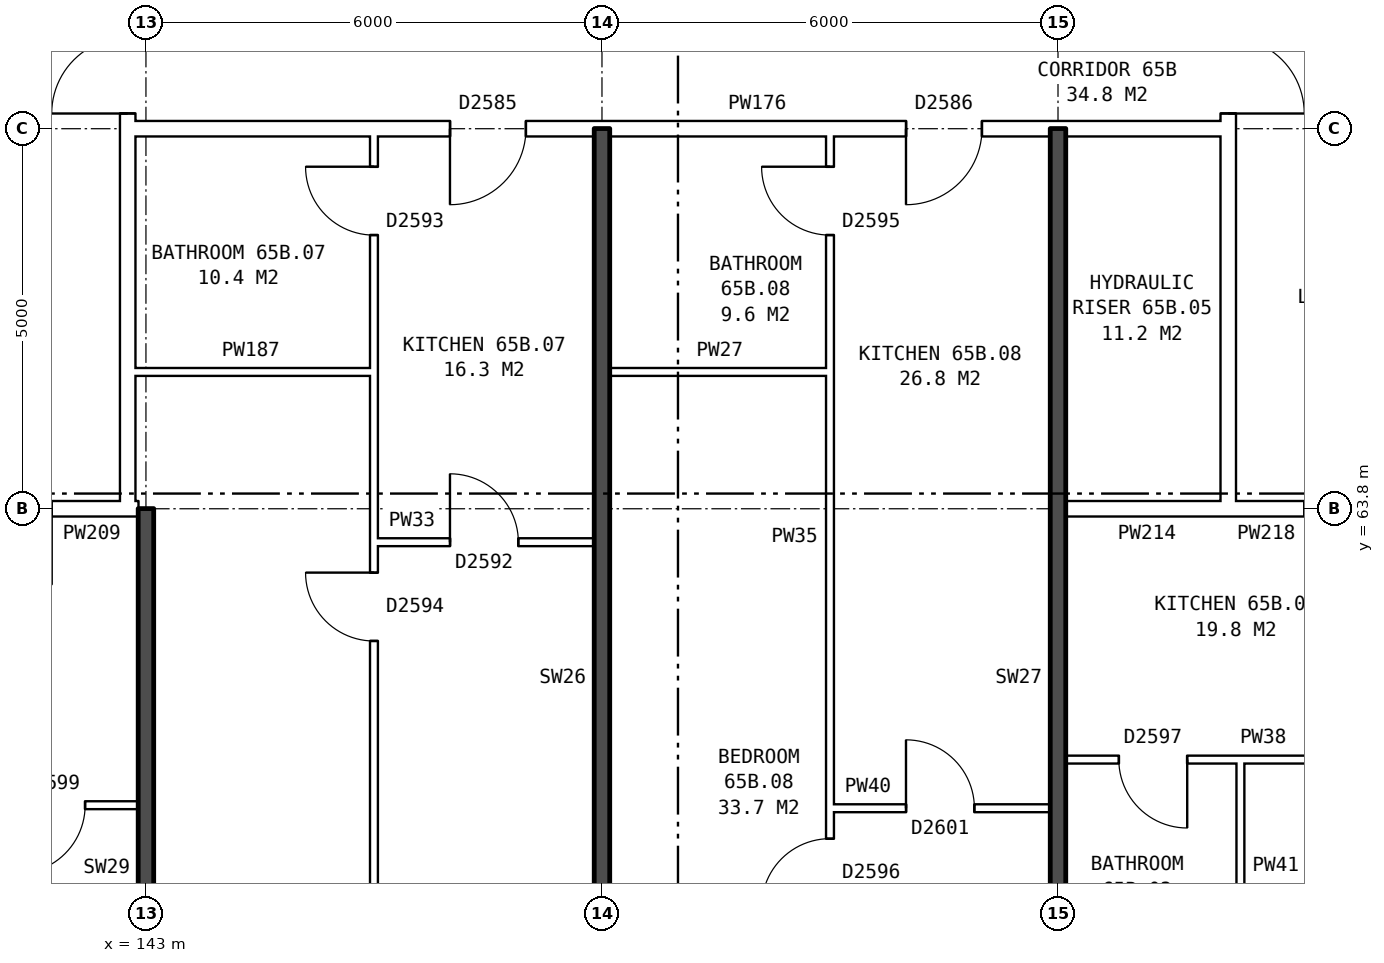
"""IFC4 building model, lengths in metres.
Left out: names, types, materials, properties, quantities, classifications, styles, units other than length and angle.
Written with IfcOpenShell. Run it as: python <this file> out.ifc"""

import sys

from ifc_helpers import new_model, si_unit, direction, frame, frame_2d, origin, place, context, subcontext, project, spatial, rectangle, extrude, element, fill, save


model = new_model("IFC4")
c1 = context("Model", 3, precision=1e-05, world=origin(), true_north=direction((0.0, 1.0)))
c2 = subcontext(c1, "Body", "Model", "MODEL_VIEW")
j1 = project(units=[si_unit("LENGTHUNIT", "METRE"), si_unit("PLANEANGLEUNIT", "RADIAN")], contexts=[c1])
p1 = place(None, origin())
s1 = spatial("IfcSite", under=j1, at=p1, CompositionType="ELEMENT")
p2 = place(p1, origin())
s2 = spatial("IfcBuilding", under=s1, at=p2, CompositionType="ELEMENT")
p3 = place(p2, frame((0.0, 0.0, 230.7)))
s3 = spatial("IfcBuildingStorey", under=s2, at=p3, CompositionType="ELEMENT", Elevation=230.7)
p4 = place(p3, frame((142.76, 63.9, 0.0), z_axis=(0.0, 0.0, 1.0), x_axis=(0.0, 1.0, 0.0)))
e1 = element("IfcWall", 1, at=p4, inside=s3, PredefinedType="PARTITIONING", context=c2, shape_type="SweptSolid", body=[
    extrude(rectangle(XDim=12.2, YDim=0.2, at=frame_2d((6.1, 0.0))), origin(), (0.0, 0.0, 1.0), 2.85),
])
p5 = place(p4, frame((5.1, 0.0, 0.0)))
e2 = element("IfcOpeningElement", 2, at=p5, cuts=e1, PredefinedType="OPENING", context=c2, shape_type="SweptSolid", body=[
    extrude(rectangle(XDim=2.0, YDim=2.1, at=frame_2d((1.0, 1.05))), frame((0.0, 0.11, 0.0), z_axis=(0.0, -1.0, 0.0), x_axis=(1.0, 0.0, 0.0)), (0.0, 0.0, 1.0), 0.22),
])
p6 = place(p3, frame((157.24, 63.9, 0.0), z_axis=(0.0, 0.0, 1.0), x_axis=(0.0, 1.0, 0.0)))
e3 = element("IfcWall", 3, at=p6, inside=s3, PredefinedType="PARTITIONING", context=c2, shape_type="SweptSolid", body=[
    extrude(rectangle(XDim=12.2, YDim=0.2, at=frame_2d((6.1, 0.0))), origin(), (0.0, 0.0, 1.0), 2.85),
])
p7 = place(p6, frame((5.1, 0.0, 0.0)))
e4 = element("IfcOpeningElement", 4, at=p7, cuts=e3, PredefinedType="OPENING", context=c2, shape_type="SweptSolid", body=[
    extrude(rectangle(XDim=2.0, YDim=2.1, at=frame_2d((1.0, 1.05))), frame((0.0, 0.11, 0.0), z_axis=(0.0, -1.0, 0.0), x_axis=(1.0, 0.0, 0.0)), (0.0, 0.0, 1.0), 0.22),
])
p8 = place(p3, frame((152.0, 59.86, 0.0), z_axis=(0.0, 0.0, 1.0), x_axis=(1.0, 0.0, 0.0)))
e5 = element("IfcWall", 5, at=p8, inside=s3, PredefinedType="PARTITIONING", context=c2, shape_type="SweptSolid", body=[
    extrude(rectangle(XDim=2.9, YDim=0.1, at=frame_2d((1.45, 0.0))), origin(), (0.0, 0.0, 1.0), 2.85),
])
p9 = place(p8, frame((1.0, 0.0, 0.0)))
e6 = element("IfcOpeningElement", 6, at=p9, cuts=e5, PredefinedType="OPENING", context=c2, shape_type="SweptSolid", body=[
    extrude(rectangle(XDim=0.9, YDim=2.1, at=frame_2d((0.45, 1.05))), frame((0.0, 0.06, 0.0), z_axis=(0.0, -1.0, 0.0), x_axis=(1.0, 0.0, 0.0)), (0.0, 0.0, 1.0), 0.12),
])
p10 = place(p3, frame((137.1, 59.9, 0.0), z_axis=(0.0, 0.0, 1.0), x_axis=(1.0, 0.0, 0.0)))
e7 = element("IfcWall", 7, at=p10, inside=s3, PredefinedType="PARTITIONING", context=c2, shape_type="SweptSolid", body=[
    extrude(rectangle(XDim=5.8, YDim=0.1, at=frame_2d((2.9, 0.0))), origin(), (0.0, 0.0, 1.0), 2.85),
])
p11 = place(p10, frame((1.3, 0.0, 0.0)))
e8 = element("IfcOpeningElement", 8, at=p11, cuts=e7, PredefinedType="OPENING", context=c2, shape_type="SweptSolid", body=[
    extrude(rectangle(XDim=0.9, YDim=2.1, at=frame_2d((0.45, 1.05))), frame((0.0, 0.06, 0.0), z_axis=(0.0, -1.0, 0.0), x_axis=(1.0, 0.0, 0.0)), (0.0, 0.0, 1.0), 0.12),
])
p12 = place(p10, frame((4.2, 0.0, 0.0)))
e9 = element("IfcOpeningElement", 9, at=p12, cuts=e7, PredefinedType="OPENING", context=c2, shape_type="SweptSolid", body=[
    extrude(rectangle(XDim=0.9, YDim=2.1, at=frame_2d((0.45, 1.05))), frame((0.0, 0.06, 0.0), z_axis=(0.0, -1.0, 0.0), x_axis=(1.0, 0.0, 0.0)), (0.0, 0.0, 1.0), 0.12),
])
p13 = place(p3, frame((155.1, 60.5, 0.0), z_axis=(0.0, 0.0, 1.0), x_axis=(1.0, 0.0, 0.0)))
e10 = element("IfcWall", 10, at=p13, inside=s3, PredefinedType="PARTITIONING", context=c2, shape_type="SweptSolid", body=[
    extrude(rectangle(XDim=5.8, YDim=0.1, at=frame_2d((2.9, 0.0))), origin(), (0.0, 0.0, 1.0), 2.85),
])
p14 = place(p13, frame((3.6, 0.0, 0.0)))
e11 = element("IfcOpeningElement", 11, at=p14, cuts=e10, PredefinedType="OPENING", context=c2, shape_type="SweptSolid", body=[
    extrude(rectangle(XDim=0.9, YDim=2.1, at=frame_2d((0.45, 1.05))), frame((0.0, 0.06, 0.0), z_axis=(0.0, -1.0, 0.0), x_axis=(1.0, 0.0, 0.0)), (0.0, 0.0, 1.0), 0.12),
])
p15 = place(p13, frame((0.7, 0.0, 0.0)))
e12 = element("IfcOpeningElement", 12, at=p15, cuts=e10, PredefinedType="OPENING", context=c2, shape_type="SweptSolid", body=[
    extrude(rectangle(XDim=0.9, YDim=2.1, at=frame_2d((0.45, 1.05))), frame((0.0, 0.06, 0.0), z_axis=(0.0, -1.0, 0.0), x_axis=(1.0, 0.0, 0.0)), (0.0, 0.0, 1.0), 0.12),
])
p16 = place(p3, frame((146.0, 63.36, 0.0), z_axis=(0.0, 0.0, 1.0), x_axis=(1.0, 0.0, 0.0)))
e13 = element("IfcWall", 13, at=p16, inside=s3, PredefinedType="PARTITIONING", context=c2, shape_type="SweptSolid", body=[
    extrude(rectangle(XDim=2.9, YDim=0.1, at=frame_2d((1.45, 0.0))), origin(), (0.0, 0.0, 1.0), 2.85),
])
p17 = place(p16, frame((1.0, 0.0, 0.0)))
e14 = element("IfcOpeningElement", 14, at=p17, cuts=e13, PredefinedType="OPENING", context=c2, shape_type="SweptSolid", body=[
    extrude(rectangle(XDim=0.9, YDim=2.1, at=frame_2d((0.45, 1.05))), frame((0.0, 0.06, 0.0), z_axis=(0.0, -1.0, 0.0), x_axis=(1.0, 0.0, 0.0)), (0.0, 0.0, 1.0), 0.12),
])
p18 = place(p3, frame((139.76, 63.8, 0.0), z_axis=(0.0, 0.0, 1.0), x_axis=(1.0, 0.0, 0.0)))
e15 = element("IfcWall", 15, at=p18, inside=s3, PredefinedType="PARTITIONING", context=c2, shape_type="SweptSolid", body=[
    extrude(rectangle(XDim=3.0, YDim=0.2, at=frame_2d((1.5, 0.0))), origin(), (0.0, 0.0, 1.0), 2.85),
])
p19 = place(p18, frame((1.0, 0.0, 0.0)))
e16 = element("IfcOpeningElement", 16, at=p19, cuts=e15, PredefinedType="OPENING", context=c2, shape_type="SweptSolid", body=[
    extrude(rectangle(XDim=1.0, YDim=2.1, at=frame_2d((0.5, 1.05))), frame((0.0, 0.11, 0.0), z_axis=(0.0, -1.0, 0.0), x_axis=(1.0, 0.0, 0.0)), (0.0, 0.0, 1.0), 0.22),
])
p20 = place(p3, frame((142.76, 63.8, 0.0), z_axis=(0.0, 0.0, 1.0), x_axis=(1.0, 0.0, 0.0)))
e17 = element("IfcWall", 17, at=p20, inside=s3, PredefinedType="PARTITIONING", context=c2, shape_type="SweptSolid", body=[
    extrude(rectangle(XDim=0.14, YDim=0.2, at=frame_2d((0.07, 0.0))), origin(), (0.0, 0.0, 1.0), 2.85),
])
p21 = place(p3, frame((155.1, 63.8, 0.0), z_axis=(0.0, 0.0, 1.0), x_axis=(1.0, 0.0, 0.0)))
e18 = element("IfcWall", 18, at=p21, inside=s3, PredefinedType="PARTITIONING", context=c2, shape_type="SweptSolid", body=[
    extrude(rectangle(XDim=2.14, YDim=0.2, at=frame_2d((1.07, 0.0))), origin(), (0.0, 0.0, 1.0), 2.85),
])
p22 = place(p3, frame((157.24, 63.8, 0.0), z_axis=(0.0, 0.0, 1.0), x_axis=(1.0, 0.0, 0.0)))
e19 = element("IfcWall", 19, at=p22, inside=s3, PredefinedType="PARTITIONING", context=c2, shape_type="SweptSolid", body=[
    extrude(rectangle(XDim=3.0, YDim=0.2, at=frame_2d((1.5, 0.0))), origin(), (0.0, 0.0, 1.0), 2.85),
])
p23 = place(p22, frame((1.0, 0.0, 0.0)))
e20 = element("IfcOpeningElement", 20, at=p23, cuts=e19, PredefinedType="OPENING", context=c2, shape_type="SweptSolid", body=[
    extrude(rectangle(XDim=1.0, YDim=2.1, at=frame_2d((0.5, 1.05))), frame((0.0, 0.11, 0.0), z_axis=(0.0, -1.0, 0.0), x_axis=(1.0, 0.0, 0.0)), (0.0, 0.0, 1.0), 0.22),
])
p24 = place(p3, frame((142.76, 65.6, 0.0), z_axis=(0.0, 0.0, 1.0), x_axis=(1.0, 0.0, 0.0)))
e21 = element("IfcWall", 21, at=p24, inside=s3, PredefinedType="PARTITIONING", context=c2, shape_type="SweptSolid", body=[
    extrude(rectangle(XDim=3.24, YDim=0.1, at=frame_2d((1.62, 0.0))), origin(), (0.0, 0.0, 1.0), 2.85),
])
p25 = place(p3, frame((149.1, 65.6, 0.0), z_axis=(0.0, 0.0, 1.0), x_axis=(1.0, 0.0, 0.0)))
e22 = element("IfcWall", 22, at=p25, inside=s3, PredefinedType="PARTITIONING", context=c2, shape_type="SweptSolid", body=[
    extrude(rectangle(XDim=2.9, YDim=0.1, at=frame_2d((1.45, 0.0))), origin(), (0.0, 0.0, 1.0), 2.85),
])
p26 = place(p3, frame((142.76, 68.8, 0.0), z_axis=(0.0, 0.0, 1.0), x_axis=(1.0, 0.0, 0.0)))
e23 = element("IfcWall", 23, at=p26, inside=s3, PredefinedType="PARTITIONING", context=c2, shape_type="SweptSolid", body=[
    extrude(rectangle(XDim=14.48, YDim=0.2, at=frame_2d((7.24, 0.0))), origin(), (0.0, 0.0, 1.0), 2.85),
])
p27 = place(p26, frame((4.24, 0.0, 0.0)))
e24 = element("IfcOpeningElement", 24, at=p27, cuts=e23, PredefinedType="OPENING", context=c2, shape_type="SweptSolid", body=[
    extrude(rectangle(XDim=1.0, YDim=2.1, at=frame_2d((0.5, 1.05))), frame((0.0, 0.11, 0.0), z_axis=(0.0, -1.0, 0.0), x_axis=(1.0, 0.0, 0.0)), (0.0, 0.0, 1.0), 0.22),
])
p28 = place(p26, frame((10.24, 0.0, 0.0)))
e25 = element("IfcOpeningElement", 25, at=p28, cuts=e23, PredefinedType="OPENING", context=c2, shape_type="SweptSolid", body=[
    extrude(rectangle(XDim=1.0, YDim=2.1, at=frame_2d((0.5, 1.05))), frame((0.0, 0.11, 0.0), z_axis=(0.0, -1.0, 0.0), x_axis=(1.0, 0.0, 0.0)), (0.0, 0.0, 1.0), 0.22),
])
p29 = place(p3, frame((143.0, 54.36, 0.0), z_axis=(0.0, 0.0, 1.0), x_axis=(0.0, 1.0, 0.0)))
e26 = element("IfcWall", 26, at=p29, inside=s3, PredefinedType="SOLIDWALL", context=c2, shape_type="SweptSolid", body=[
    extrude(rectangle(XDim=9.44, YDim=0.2, at=frame_2d((4.72, 0.0))), origin(), (0.0, 0.0, 1.0), 2.85),
])
p30 = place(p3, frame((146.0, 54.36, 0.0), z_axis=(0.0, 0.0, 1.0), x_axis=(0.0, 1.0, 0.0)))
e27 = element("IfcWall", 27, at=p30, inside=s3, PredefinedType="PARTITIONING", context=c2, shape_type="SweptSolid", body=[
    extrude(rectangle(XDim=14.34, YDim=0.1, at=frame_2d((7.17, 0.0))), origin(), (0.0, 0.0, 1.0), 2.85),
])
p31 = place(p30, frame((7.7, 0.0, 0.0)))
e28 = element("IfcOpeningElement", 28, at=p31, cuts=e27, PredefinedType="OPENING", context=c2, shape_type="SweptSolid", body=[
    extrude(rectangle(XDim=0.9, YDim=2.1, at=frame_2d((0.45, 1.05))), frame((0.0, 0.06, 0.0), z_axis=(0.0, -1.0, 0.0), x_axis=(1.0, 0.0, 0.0)), (0.0, 0.0, 1.0), 0.12),
])
p32 = place(p30, frame((13.04, 0.0, 0.0)))
e29 = element("IfcOpeningElement", 29, at=p32, cuts=e27, PredefinedType="OPENING", context=c2, shape_type="SweptSolid", body=[
    extrude(rectangle(XDim=0.9, YDim=2.1, at=frame_2d((0.45, 1.05))), frame((0.0, 0.06, 0.0), z_axis=(0.0, -1.0, 0.0), x_axis=(1.0, 0.0, 0.0)), (0.0, 0.0, 1.0), 0.12),
])
p33 = place(p3, frame((149.0, 54.36, 0.0), z_axis=(0.0, 0.0, 1.0), x_axis=(0.0, 1.0, 0.0)))
e30 = element("IfcWall", 30, at=p33, inside=s3, PredefinedType="SOLIDWALL", context=c2, shape_type="SweptSolid", body=[
    extrude(rectangle(XDim=14.44, YDim=0.2, at=frame_2d((7.22, 0.0))), origin(), (0.0, 0.0, 1.0), 2.85),
])
p34 = place(p3, frame((152.0, 54.36, 0.0), z_axis=(0.0, 0.0, 1.0), x_axis=(0.0, 1.0, 0.0)))
e31 = element("IfcWall", 31, at=p34, inside=s3, PredefinedType="PARTITIONING", context=c2, shape_type="SweptSolid", body=[
    extrude(rectangle(XDim=14.34, YDim=0.1, at=frame_2d((7.17, 0.0))), origin(), (0.0, 0.0, 1.0), 2.85),
])
p35 = place(p34, frame((4.2, 0.0, 0.0)))
e32 = element("IfcOpeningElement", 32, at=p35, cuts=e31, PredefinedType="OPENING", context=c2, shape_type="SweptSolid", body=[
    extrude(rectangle(XDim=0.9, YDim=2.1, at=frame_2d((0.45, 1.05))), frame((0.0, 0.06, 0.0), z_axis=(0.0, -1.0, 0.0), x_axis=(1.0, 0.0, 0.0)), (0.0, 0.0, 1.0), 0.12),
])
p36 = place(p34, frame((13.04, 0.0, 0.0)))
e33 = element("IfcOpeningElement", 33, at=p36, cuts=e31, PredefinedType="OPENING", context=c2, shape_type="SweptSolid", body=[
    extrude(rectangle(XDim=0.9, YDim=2.1, at=frame_2d((0.45, 1.05))), frame((0.0, 0.06, 0.0), z_axis=(0.0, -1.0, 0.0), x_axis=(1.0, 0.0, 0.0)), (0.0, 0.0, 1.0), 0.12),
])
p37 = place(p3, frame((155.0, 54.36, 0.0), z_axis=(0.0, 0.0, 1.0), x_axis=(0.0, 1.0, 0.0)))
e34 = element("IfcWall", 34, at=p37, inside=s3, PredefinedType="SOLIDWALL", context=c2, shape_type="SweptSolid", body=[
    extrude(rectangle(XDim=14.44, YDim=0.2, at=frame_2d((7.22, 0.0))), origin(), (0.0, 0.0, 1.0), 2.85),
])
p38 = place(p3, frame((157.4, 57.75, 0.0), z_axis=(0.0, 0.0, 1.0), x_axis=(0.0, 1.0, 0.0)))
e35 = element("IfcWall", 35, at=p38, inside=s3, PredefinedType="PARTITIONING", context=c2, shape_type="SweptSolid", body=[
    extrude(rectangle(XDim=2.7, YDim=0.1, at=frame_2d((1.35, 0.0))), origin(), (0.0, 0.0, 1.0), 2.85),
])
p39 = place(p5, origin())
e36 = element("IfcDoor", 36, at=p39, inside=s3, OperationType="DOUBLE_DOOR_SINGLE_SWING", PredefinedType="DOOR", context=c2, shape_type="SweptSolid", body=[
    extrude(rectangle(XDim=2.0, YDim=2.1, at=frame_2d((1.0, 1.05))), frame((0.0, 0.025, 0.0), z_axis=(0.0, -1.0, 0.0), x_axis=(1.0, 0.0, 0.0)), (0.0, 0.0, 1.0), 0.05),
])
fill(e2, e36)
p40 = place(p7, frame((2.0, 0.0, 0.0), z_axis=(0.0, 0.0, 1.0), x_axis=(-1.0, 0.0, 0.0)))
e37 = element("IfcDoor", 37, at=p40, inside=s3, OperationType="DOUBLE_DOOR_SINGLE_SWING", PredefinedType="DOOR", context=c2, shape_type="SweptSolid", body=[
    extrude(rectangle(XDim=2.0, YDim=2.1, at=frame_2d((1.0, 1.05))), frame((0.0, 0.025, 0.0), z_axis=(0.0, -1.0, 0.0), x_axis=(1.0, 0.0, 0.0)), (0.0, 0.0, 1.0), 0.05),
])
fill(e4, e37)
p41 = place(p12, frame((0.9, 0.0, 0.0), z_axis=(0.0, 0.0, 1.0), x_axis=(-1.0, 0.0, 0.0)))
e38 = element("IfcDoor", 38, at=p41, inside=s3, OperationType="SINGLE_SWING_RIGHT", PredefinedType="DOOR", context=c2, shape_type="SweptSolid", body=[
    extrude(rectangle(XDim=0.9, YDim=2.1, at=frame_2d((0.45, 1.05))), frame((0.0, 0.025, 0.0), z_axis=(0.0, -1.0, 0.0), x_axis=(1.0, 0.0, 0.0)), (0.0, 0.0, 1.0), 0.05),
])
fill(e9, e38)
p42 = place(p15, frame((0.9, 0.0, 0.0), z_axis=(0.0, 0.0, 1.0), x_axis=(-1.0, 0.0, 0.0)))
e39 = element("IfcDoor", 39, at=p42, inside=s3, OperationType="SINGLE_SWING_LEFT", PredefinedType="DOOR", context=c2, shape_type="SweptSolid", body=[
    extrude(rectangle(XDim=0.9, YDim=2.1, at=frame_2d((0.45, 1.05))), frame((0.0, 0.025, 0.0), z_axis=(0.0, -1.0, 0.0), x_axis=(1.0, 0.0, 0.0)), (0.0, 0.0, 1.0), 0.05),
])
fill(e12, e39)
p43 = place(p31, origin())
e40 = element("IfcDoor", 40, at=p43, inside=s3, OperationType="SINGLE_SWING_RIGHT", PredefinedType="DOOR", context=c2, shape_type="SweptSolid", body=[
    extrude(rectangle(XDim=0.9, YDim=2.1, at=frame_2d((0.45, 1.05))), frame((0.0, 0.025, 0.0), z_axis=(0.0, -1.0, 0.0), x_axis=(1.0, 0.0, 0.0)), (0.0, 0.0, 1.0), 0.05),
])
fill(e28, e40)
p44 = place(p27, frame((1.0, 0.0, 0.0), z_axis=(0.0, 0.0, 1.0), x_axis=(-1.0, 0.0, 0.0)))
e41 = element("IfcDoor", 41, at=p44, inside=s3, OperationType="SINGLE_SWING_RIGHT", PredefinedType="DOOR", context=c2, shape_type="SweptSolid", body=[
    extrude(rectangle(XDim=1.0, YDim=2.1, at=frame_2d((0.5, 1.05))), frame((0.0, 0.025, 0.0), z_axis=(0.0, -1.0, 0.0), x_axis=(1.0, 0.0, 0.0)), (0.0, 0.0, 1.0), 0.05),
])
fill(e24, e41)
p45 = place(p17, origin())
e42 = element("IfcDoor", 42, at=p45, inside=s3, OperationType="SINGLE_SWING_LEFT", PredefinedType="DOOR", context=c2, shape_type="SweptSolid", body=[
    extrude(rectangle(XDim=0.9, YDim=2.1, at=frame_2d((0.45, 1.05))), frame((0.0, 0.025, 0.0), z_axis=(0.0, -1.0, 0.0), x_axis=(1.0, 0.0, 0.0)), (0.0, 0.0, 1.0), 0.05),
])
fill(e14, e42)
p46 = place(p32, origin())
e43 = element("IfcDoor", 43, at=p46, inside=s3, OperationType="SINGLE_SWING_RIGHT", PredefinedType="DOOR", context=c2, shape_type="SweptSolid", body=[
    extrude(rectangle(XDim=0.9, YDim=2.1, at=frame_2d((0.45, 1.05))), frame((0.0, 0.025, 0.0), z_axis=(0.0, -1.0, 0.0), x_axis=(1.0, 0.0, 0.0)), (0.0, 0.0, 1.0), 0.05),
])
fill(e29, e43)
p47 = place(p35, origin())
e44 = element("IfcDoor", 44, at=p47, inside=s3, OperationType="SINGLE_SWING_LEFT", PredefinedType="DOOR", context=c2, shape_type="SweptSolid", body=[
    extrude(rectangle(XDim=0.9, YDim=2.1, at=frame_2d((0.45, 1.05))), frame((0.0, 0.025, 0.0), z_axis=(0.0, -1.0, 0.0), x_axis=(1.0, 0.0, 0.0)), (0.0, 0.0, 1.0), 0.05),
])
fill(e32, e44)
p48 = place(p28, frame((1.0, 0.0, 0.0), z_axis=(0.0, 0.0, 1.0), x_axis=(-1.0, 0.0, 0.0)))
e45 = element("IfcDoor", 45, at=p48, inside=s3, OperationType="SINGLE_SWING_RIGHT", PredefinedType="DOOR", context=c2, shape_type="SweptSolid", body=[
    extrude(rectangle(XDim=1.0, YDim=2.1, at=frame_2d((0.5, 1.05))), frame((0.0, 0.025, 0.0), z_axis=(0.0, -1.0, 0.0), x_axis=(1.0, 0.0, 0.0)), (0.0, 0.0, 1.0), 0.05),
])
fill(e25, e45)
p49 = place(p9, origin())
e46 = element("IfcDoor", 46, at=p49, inside=s3, OperationType="SINGLE_SWING_LEFT", PredefinedType="DOOR", context=c2, shape_type="SweptSolid", body=[
    extrude(rectangle(XDim=0.9, YDim=2.1, at=frame_2d((0.45, 1.05))), frame((0.0, 0.025, 0.0), z_axis=(0.0, -1.0, 0.0), x_axis=(1.0, 0.0, 0.0)), (0.0, 0.0, 1.0), 0.05),
])
fill(e6, e46)
p50 = place(p36, origin())
e47 = element("IfcDoor", 47, at=p50, inside=s3, OperationType="SINGLE_SWING_RIGHT", PredefinedType="DOOR", context=c2, shape_type="SweptSolid", body=[
    extrude(rectangle(XDim=0.9, YDim=2.1, at=frame_2d((0.45, 1.05))), frame((0.0, 0.025, 0.0), z_axis=(0.0, -1.0, 0.0), x_axis=(1.0, 0.0, 0.0)), (0.0, 0.0, 1.0), 0.05),
])
fill(e33, e47)
save(model, sys.argv[1])
